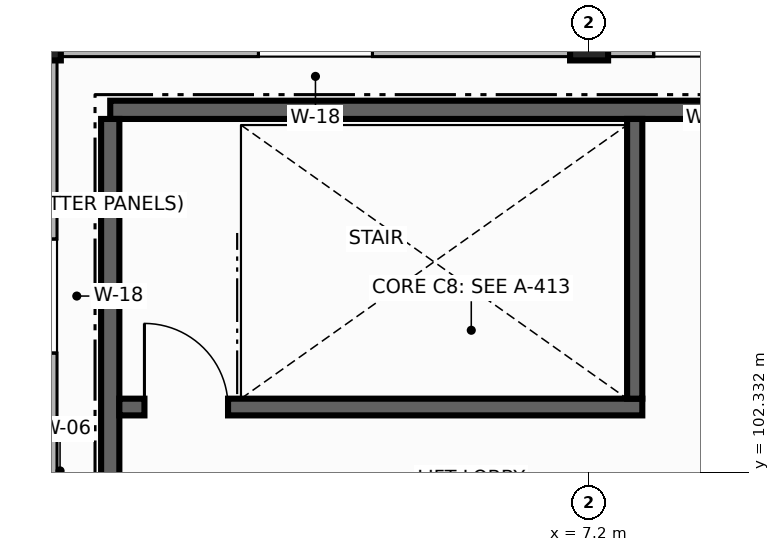
"""IFC4 building model, lengths in metres.
Left out: names, types, materials, properties, quantities, classifications, styles, units other than length and angle.
Written with IfcOpenShell. Run it as: python <this file> out.ifc"""

import sys

from ifc_helpers import new_model, si_unit, direction, frame, frame_2d, origin, origin_2d, place, context, subcontext, project, spatial, rectangle, extrude, element, fill, save


model = new_model("IFC4")
c1 = context("Model", 3, precision=1e-05, world=origin(), true_north=direction((0.0, 1.0)))
c2 = subcontext(c1, "Body", "Model", "MODEL_VIEW")
j1 = project(units=[si_unit("LENGTHUNIT", "METRE"), si_unit("PLANEANGLEUNIT", "RADIAN")], contexts=[c1])
p1 = place(None, origin())
s1 = spatial("IfcSite", under=j1, at=p1, CompositionType="ELEMENT")
p2 = place(p1, origin())
s2 = spatial("IfcBuilding", under=s1, at=p2, CompositionType="ELEMENT")
p3 = place(p2, frame((0.0, 0.0, 16.0)))
s3 = spatial("IfcBuildingStorey", under=s2, at=p3, CompositionType="ELEMENT", Elevation=16.0)
for number, where, z_axis, x_axis in (
    (1, (0.0, 108.0, 0.0), (0.0, 0.0, 1.0), (1.0, 0.0, 0.0)),
    (2, (7.2, 108.0, 0.0), (0.0, 0.0, 1.0), (1.0, 0.0, 0.0)),
):
    element("IfcColumn", number, at=place(p3, frame(where, z_axis=z_axis, x_axis=x_axis)), inside=s3, PredefinedType="COLUMN", context=c2, shape_type="SweptSolid", body=[
        extrude(rectangle(XDim=0.5, YDim=0.5, at=origin_2d()), origin(), (0.0, 0.0, 1.0), 3.46),
    ])
p4 = place(p3, frame((14.4, 108.0, 0.0), z_axis=(0.0, 0.0, 1.0), x_axis=(-1.0, 0.0, 0.0)))
e3 = element("IfcWall", 3, at=p4, inside=s3, PredefinedType="SOLIDWALL", context=c2, shape_type="SweptSolid", body=[
    extrude(rectangle(XDim=7.2, YDim=0.4, at=frame_2d((3.6, 0.0))), origin(), (0.0, 0.0, 1.0), 2.79),
])
p5 = place(p4, frame((4.85, 0.0, 0.9)))
e4 = element("IfcOpeningElement", 4, at=p5, cuts=e3, PredefinedType="OPENING", context=c2, shape_type="SweptSolid", body=[
    extrude(rectangle(XDim=1.5, YDim=1.6, at=frame_2d((0.75, 0.8))), frame((0.0, 0.21, 0.0), z_axis=(0.0, -1.0, 0.0), x_axis=(1.0, 0.0, 0.0)), (0.0, 0.0, 1.0), 0.42),
])
p6 = place(p3, frame((7.2, 108.0, 0.0), z_axis=(0.0, 0.0, 1.0), x_axis=(-1.0, 0.0, 0.0)))
e5 = element("IfcWall", 5, at=p6, inside=s3, PredefinedType="SOLIDWALL", context=c2, shape_type="SweptSolid", body=[
    extrude(rectangle(XDim=7.2, YDim=0.4, at=frame_2d((3.6, 0.0))), origin(), (0.0, 0.0, 1.0), 2.79),
])
p7 = place(p6, frame((2.85, 0.0, 0.9)))
e6 = element("IfcOpeningElement", 6, at=p7, cuts=e5, PredefinedType="OPENING", context=c2, shape_type="SweptSolid", body=[
    extrude(rectangle(XDim=1.5, YDim=1.6, at=frame_2d((0.75, 0.8))), frame((0.0, 0.21, 0.0), z_axis=(0.0, -1.0, 0.0), x_axis=(1.0, 0.0, 0.0)), (0.0, 0.0, 1.0), 0.42),
])
p8 = place(p3, frame((0.0, 108.0, 0.0), z_axis=(0.0, 0.0, 1.0), x_axis=(0.0, -1.0, 0.0)))
e7 = element("IfcWall", 7, at=p8, inside=s3, PredefinedType="SOLIDWALL", context=c2, shape_type="SweptSolid", body=[
    extrude(rectangle(XDim=7.2, YDim=0.4, at=frame_2d((3.6, 0.0))), origin(), (0.0, 0.0, 1.0), 2.79),
])
p9 = place(p8, frame((2.6, 0.0, 0.9)))
e8 = element("IfcOpeningElement", 8, at=p9, cuts=e7, PredefinedType="OPENING", context=c2, shape_type="SweptSolid", body=[
    extrude(rectangle(XDim=1.5, YDim=1.6, at=frame_2d((0.75, 0.8))), frame((0.0, 0.21, 0.0), z_axis=(0.0, -1.0, 0.0), x_axis=(1.0, 0.0, 0.0)), (0.0, 0.0, 1.0), 0.42),
])
p10 = place(p3, frame((10.4, 107.1, 0.0), z_axis=(0.0, 0.0, 1.0), x_axis=(-1.0, 0.0, 0.0)))
e9 = element("IfcWall", 9, at=p10, inside=s3, PredefinedType="SHEAR", context=c2, shape_type="SweptSolid", body=[
    extrude(rectangle(XDim=9.5, YDim=0.24, at=frame_2d((4.75, 0.0))), origin(), (0.0, 0.0, 1.0), 3.46),
])
p11 = place(p3, frame((0.9, 106.98, 0.0), z_axis=(0.0, 0.0, 1.0), x_axis=(0.0, -1.0, 0.0)))
e10 = element("IfcWall", 10, at=p11, inside=s3, PredefinedType="SHEAR", context=c2, shape_type="SweptSolid", body=[
    extrude(rectangle(XDim=5.56, YDim=0.24, at=frame_2d((2.78, 0.0))), origin(), (0.0, 0.0, 1.0), 3.46),
])
p12 = place(p3, frame((1.02, 103.19, 0.0), z_axis=(0.0, 0.0, 1.0), x_axis=(1.0, 0.0, 0.0)))
e11 = element("IfcWall", 11, at=p12, inside=s3, PredefinedType="SHEAR", context=c2, shape_type="SweptSolid", body=[
    extrude(rectangle(XDim=6.88, YDim=0.22, at=frame_2d((3.44, 0.0))), origin(), (0.0, 0.0, 1.0), 3.46),
])
p13 = place(p12, frame((0.33, 0.0, 0.0)))
e12 = element("IfcOpeningElement", 12, at=p13, cuts=e11, PredefinedType="OPENING", context=c2, shape_type="SweptSolid", body=[
    extrude(rectangle(XDim=1.1, YDim=2.15, at=frame_2d((0.55, 1.075))), frame((0.0, 0.12, 0.0), z_axis=(0.0, -1.0, 0.0), x_axis=(1.0, 0.0, 0.0)), (0.0, 0.0, 1.0), 0.24),
])
p14 = place(p3, frame((7.8, 103.3, 0.0), z_axis=(0.0, 0.0, 1.0), x_axis=(0.0, 1.0, 0.0)))
e13 = element("IfcWall", 13, at=p14, inside=s3, PredefinedType="SHEAR", context=c2, shape_type="SweptSolid", body=[
    extrude(rectangle(XDim=3.68, YDim=0.2, at=frame_2d((1.84, 0.0))), origin(), (0.0, 0.0, 1.0), 3.46),
])
p15 = place(p13, origin())
e14 = element("IfcDoor", 14, at=p15, inside=s3, OperationType="SINGLE_SWING_LEFT", PredefinedType="DOOR", context=c2, shape_type="SweptSolid", body=[
    extrude(rectangle(XDim=1.1, YDim=2.15, at=frame_2d((0.55, 1.075))), frame((0.0, 0.025, 0.0), z_axis=(0.0, -1.0, 0.0), x_axis=(1.0, 0.0, 0.0)), (0.0, 0.0, 1.0), 0.05),
])
fill(e12, e14)
save(model, sys.argv[1])
